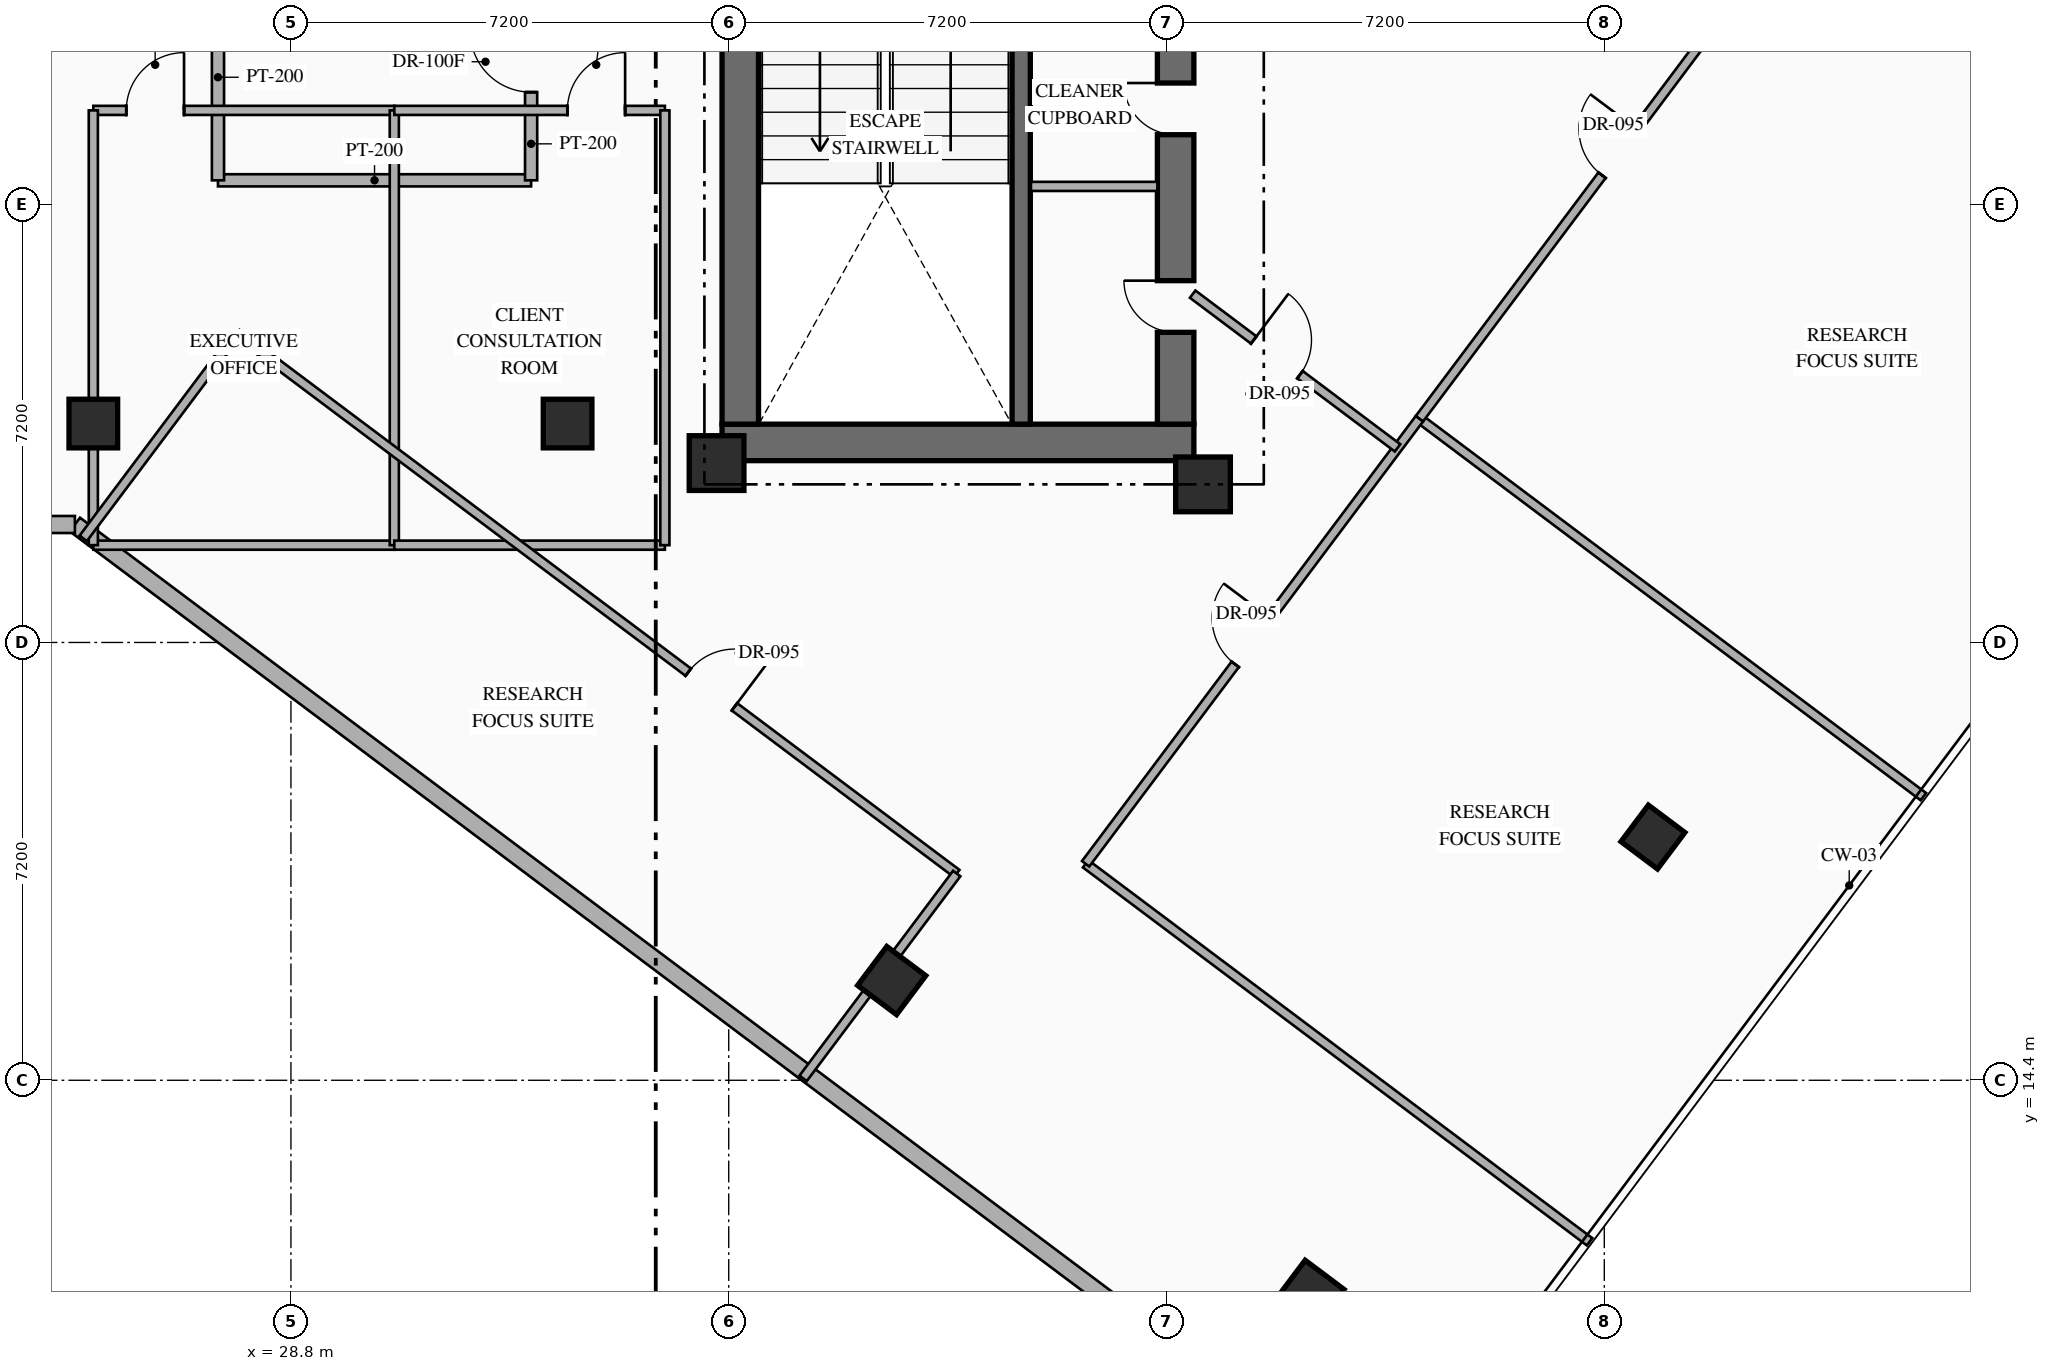
"""IFC4 building model, lengths in metres.
Left out: names, types, materials, properties, quantities, classifications, styles, units other than length and angle.
Written with IfcOpenShell. Run it as: python <this file> out.ifc"""

import sys

from ifc_helpers import new_model, si_unit, direction, frame, frame_2d, origin, origin_2d, place, context, subcontext, project, spatial, rectangle, hollow_rectangle, extrude, element, fill, save


model = new_model("IFC4")
c1 = context("Model", 3, precision=1e-05, world=origin(), true_north=direction((0.0, 1.0)))
c2 = subcontext(c1, "Body", "Model", "MODEL_VIEW")
j1 = project(units=[si_unit("LENGTHUNIT", "METRE"), si_unit("PLANEANGLEUNIT", "RADIAN")], contexts=[c1])
p1 = place(None, origin())
s1 = spatial("IfcSite", under=j1, at=p1, CompositionType="ELEMENT")
p2 = place(p1, origin())
s2 = spatial("IfcBuilding", under=s1, at=p2, CompositionType="ELEMENT")
p3 = place(p2, frame((0.0, 0.0, 174.45)))
s3 = spatial("IfcBuildingStorey", under=s2, at=p3, CompositionType="ELEMENT", Elevation=174.45)
p4 = place(p3, frame((35.89, 24.89, 0.0), z_axis=(0.0, 0.0, 1.0), x_axis=(1.0, 0.0, 0.0)))
e1 = element("IfcWall", 1, at=p4, inside=s3, PredefinedType="SHEAR", context=c2, shape_type="SweptSolid", body=[
    extrude(rectangle(XDim=7.76, YDim=0.6, at=frame_2d((3.88, 0.0))), origin(), (0.0, 0.0, 1.0), 3.6),
])
p5 = place(p3, frame((36.19, 25.19, 0.0), z_axis=(0.0, 0.0, 1.0), x_axis=(0.0, 1.0, 0.0)))
e2 = element("IfcWall", 2, at=p5, inside=s3, PredefinedType="SHEAR", context=c2, shape_type="SweptSolid", body=[
    extrude(rectangle(XDim=9.48, YDim=0.6, at=frame_2d((4.74, 0.0))), origin(), (0.0, 0.0, 1.0), 3.6),
])
p6 = place(p3, frame((43.35, 25.19, 0.0), z_axis=(0.0, 0.0, 1.0), x_axis=(0.0, 1.0, 0.0)))
e3 = element("IfcWall", 3, at=p6, inside=s3, PredefinedType="SHEAR", context=c2, shape_type="SweptSolid", body=[
    extrude(rectangle(XDim=9.48, YDim=0.6, at=frame_2d((4.74, 0.0))), origin(), (0.0, 0.0, 1.0), 3.6),
])
p7 = place(p6, frame((1.51, 0.0, 0.0)))
e4 = element("IfcOpeningElement", 4, at=p7, cuts=e3, PredefinedType="OPENING", context=c2, shape_type="SweptSolid", body=[
    extrude(rectangle(XDim=0.85, YDim=2.08, at=frame_2d((0.425, 1.04))), frame((0.0, 0.31, 0.0), z_axis=(0.0, -1.0, 0.0), x_axis=(1.0, 0.0, 0.0)), (0.0, 0.0, 1.0), 0.62),
])
p8 = place(p6, frame((4.76, 0.0, 0.0)))
e5 = element("IfcOpeningElement", 5, at=p8, cuts=e3, PredefinedType="OPENING", context=c2, shape_type="SweptSolid", body=[
    extrude(rectangle(XDim=0.85, YDim=2.08, at=frame_2d((0.425, 1.04))), frame((0.0, 0.31, 0.0), z_axis=(0.0, -1.0, 0.0), x_axis=(1.0, 0.0, 0.0)), (0.0, 0.0, 1.0), 0.62),
])
p9 = place(p3, frame((40.81, 25.19, 0.0), z_axis=(0.0, 0.0, 1.0), x_axis=(0.0, 1.0, 0.0)))
e6 = element("IfcWall", 6, at=p9, inside=s3, PredefinedType="SHEAR", context=c2, shape_type="SweptSolid", body=[
    extrude(rectangle(XDim=9.48, YDim=0.3, at=frame_2d((4.74, 0.0))), origin(), (0.0, 0.0, 1.0), 3.6),
])
for number, where, z_axis, x_axis in (
    (7, (35.8, 24.55, 0.0), (0.0, 0.0, 1.0), (1.0, 0.0, 0.0)),
    (8, (43.8, 24.2, 0.0), (0.0, 0.0, 1.0), (1.0, 0.0, 0.0)),
):
    element("IfcColumn", number, at=place(p3, frame(where, z_axis=z_axis, x_axis=x_axis)), inside=s3, PredefinedType="COLUMN", context=c2, shape_type="SweptSolid", body=[
        extrude(rectangle(XDim=0.9, YDim=0.9, at=origin_2d()), origin(), (0.0, 0.0, 1.0), 3.6),
    ])
for number, where, z_axis, x_axis in (
    (9, (25.55, 25.2, 0.0), (0.0, 0.0, 1.0), (1.0, 0.0, 0.0)),
    (10, (33.35, 25.2, 0.0), (0.0, 0.0, 1.0), (1.0, 0.0, 0.0)),
    (11, (38.68, 16.04, 0.0), (0.0, 0.0, 1.0), (0.8, -0.6, 0.0)),
    (12, (45.56, 10.88, 0.0), (0.0, 0.0, 1.0), (0.8, -0.6, 0.0)),
):
    element("IfcColumn", number, at=place(p3, frame(where, z_axis=z_axis, x_axis=x_axis)), inside=s3, PredefinedType="COLUMN", context=c2, shape_type="SweptSolid", body=[
        extrude(hollow_rectangle(XDim=0.8, YDim=0.8, WallThickness=0.032, at=origin_2d()), origin(), (0.0, 0.0, 1.0), 3.6),
    ])
p10 = place(p3, frame((51.2, 18.4, 0.0), z_axis=(0.0, 0.0, 1.0), x_axis=(0.799999996291, -0.600000004945, 0.0)))
e13 = element("IfcColumn", 13, at=p10, inside=s3, PredefinedType="COLUMN", context=c2, shape_type="SweptSolid", body=[
    extrude(hollow_rectangle(XDim=0.75, YDim=0.75, WallThickness=0.028, at=origin_2d()), origin(), (0.0, 0.0, 1.0), 3.6),
])
p11 = place(p3, frame((44.86, 40.73, 0.0), z_axis=(0.0, 0.0, 1.0), x_axis=(0.800007624502, -0.599989833863, 0.0)))
e14 = element("IfcWall", 14, at=p11, inside=s3, PredefinedType="STANDARD", context=c2, shape_type="SweptSolid", body=[
    extrude(rectangle(XDim=19.212, YDim=0.28, at=frame_2d((9.606, 0.0))), origin(), (0.0, 0.0, 1.0), 3.35),
])
p12 = place(p11, frame((1.755, 0.0, 0.0)))
e15 = element("IfcOpeningElement", 15, at=p12, cuts=e14, PredefinedType="OPENING", context=c2, shape_type="SweptSolid", body=[
    extrude(rectangle(XDim=1.1, YDim=2.2, at=frame_2d((0.55, 1.1))), frame((0.0, 0.15, 0.0), z_axis=(0.0, -1.0, 0.0), x_axis=(1.0, 0.0, 0.0)), (0.0, 0.0, 1.0), 0.3),
])
p13 = place(p11, frame((13.509, 0.0, 0.85)))
e16 = element("IfcOpeningElement", 16, at=p13, cuts=e14, PredefinedType="OPENING", context=c2, shape_type="SweptSolid", body=[
    extrude(rectangle(XDim=1.8, YDim=2.1, at=frame_2d((0.9, 1.05))), frame((0.0, 0.15, 0.0), z_axis=(0.0, -1.0, 0.0), x_axis=(1.0, 0.0, 0.0)), (0.0, 0.0, 1.0), 0.3),
])
p14 = place(p3, frame((44.918, 8.787, 0.0), z_axis=(0.0, 0.0, 1.0), x_axis=(-0.800004765927, 0.599993645378, 0.0)))
e17 = element("IfcWall", 17, at=p14, inside=s3, PredefinedType="STANDARD", context=c2, shape_type="SweptSolid", body=[
    extrude(rectangle(XDim=24.588, YDim=0.28, at=frame_2d((12.294, 0.0))), origin(), (0.0, 0.0, 1.0), 3.35),
])
p15 = place(p3, frame((25.247, 23.54, 0.0), z_axis=(0.0, 0.0, 1.0), x_axis=(-1.0, 0.0, 0.0)))
e18 = element("IfcWall", 18, at=p15, inside=s3, PredefinedType="STANDARD", context=c2, shape_type="SweptSolid", body=[
    extrude(rectangle(XDim=6.747, YDim=0.28, at=frame_2d((3.374, 0.0))), origin(), (0.0, 0.0, 1.0), 3.35),
])
p16 = place(p3, frame((40.97, 29.1, 0.0), z_axis=(0.0, 0.0, 1.0), x_axis=(1.0, 0.0, 0.0)))
e19 = element("IfcWall", 19, at=p16, inside=s3, PredefinedType="PARTITIONING", context=c2, shape_type="SweptSolid", body=[
    extrude(rectangle(XDim=2.08, YDim=0.15, at=frame_2d((1.04, 0.0))), origin(), (0.0, 0.0, 1.0), 3.35),
])
p17 = place(p3, frame((27.6, 29.2, 0.0), z_axis=(0.0, 0.0, 1.0), x_axis=(1.0, 0.0, 0.0)))
e20 = element("IfcWall", 20, at=p17, inside=s3, PredefinedType="STANDARD", context=c2, shape_type="SweptSolid", body=[
    extrude(rectangle(XDim=5.15, YDim=0.2, at=frame_2d((2.575, 0.0))), origin(), (0.0, 0.0, 1.0), 3.35),
])
p18 = place(p3, frame((27.6, 29.2, 0.0), z_axis=(0.0, 0.0, 1.0), x_axis=(0.0, 1.0, 0.0)))
e21 = element("IfcWall", 21, at=p18, inside=s3, PredefinedType="STANDARD", context=c2, shape_type="SweptSolid", body=[
    extrude(rectangle(XDim=3.39, YDim=0.2, at=frame_2d((1.695, 0.0))), origin(), (0.0, 0.0, 1.0), 3.35),
])
p19 = place(p3, frame((32.75, 29.2, 0.0), z_axis=(0.0, 0.0, 1.0), x_axis=(0.0, 1.0, 0.0)))
e22 = element("IfcWall", 22, at=p19, inside=s3, PredefinedType="STANDARD", context=c2, shape_type="SweptSolid", body=[
    extrude(rectangle(XDim=3.39, YDim=0.2, at=frame_2d((1.695, 0.0))), origin(), (0.0, 0.0, 1.0), 3.35),
])
p20 = place(p19, frame((1.45, 0.0, 0.0)))
e23 = element("IfcOpeningElement", 23, at=p20, cuts=e22, PredefinedType="OPENING", context=c2, shape_type="SweptSolid", body=[
    extrude(rectangle(XDim=1.0, YDim=2.2, at=frame_2d((0.5, 1.1))), frame((0.0, 0.11, 0.0), z_axis=(0.0, -1.0, 0.0), x_axis=(1.0, 0.0, 0.0)), (0.0, 0.0, 1.0), 0.22),
])
p21 = place(p3, frame((25.55, 23.2, 0.0), z_axis=(0.0, 0.0, 1.0), x_axis=(1.0, 0.0, 0.0)))
e24 = element("IfcWall", 24, at=p21, inside=s3, PredefinedType="PARTITIONING", context=c2, shape_type="SweptSolid", body=[
    extrude(rectangle(XDim=4.95, YDim=0.15, at=frame_2d((2.475, 0.0))), origin(), (0.0, 0.0, 1.0), 3.35),
])
p22 = place(p3, frame((25.55, 30.35, 0.0), z_axis=(0.0, 0.0, 1.0), x_axis=(1.0, 0.0, 0.0)))
e25 = element("IfcWall", 25, at=p22, inside=s3, PredefinedType="PARTITIONING", context=c2, shape_type="SweptSolid", body=[
    extrude(rectangle(XDim=4.95, YDim=0.15, at=frame_2d((2.475, 0.0))), origin(), (0.0, 0.0, 1.0), 3.35),
])
p23 = place(p22, frame((0.542, 0.0, 0.0)))
e26 = element("IfcOpeningElement", 26, at=p23, cuts=e25, PredefinedType="OPENING", context=c2, shape_type="SweptSolid", body=[
    extrude(rectangle(XDim=0.95, YDim=2.15, at=frame_2d((0.475, 1.075))), frame((0.0, 0.085, 0.0), z_axis=(0.0, -1.0, 0.0), x_axis=(1.0, 0.0, 0.0)), (0.0, 0.0, 1.0), 0.17),
])
p24 = place(p3, frame((25.55, 23.2, 0.0), z_axis=(0.0, 0.0, 1.0), x_axis=(0.0, 1.0, 0.0)))
e27 = element("IfcWall", 27, at=p24, inside=s3, PredefinedType="PARTITIONING", context=c2, shape_type="SweptSolid", body=[
    extrude(rectangle(XDim=7.15, YDim=0.15, at=frame_2d((3.575, 0.0))), origin(), (0.0, 0.0, 1.0), 2.695),
])
p25 = place(p3, frame((30.5, 23.2, 0.0), z_axis=(0.0, 0.0, 1.0), x_axis=(0.0, 1.0, 0.0)))
e28 = element("IfcWall", 28, at=p25, inside=s3, PredefinedType="PARTITIONING", context=c2, shape_type="SweptSolid", body=[
    extrude(rectangle(XDim=7.15, YDim=0.15, at=frame_2d((3.575, 0.0))), origin(), (0.0, 0.0, 1.0), 3.35),
])
p26 = place(p3, frame((30.5, 23.2, 0.0), z_axis=(0.0, 0.0, 1.0), x_axis=(1.0, 0.0, 0.0)))
e29 = element("IfcWall", 29, at=p26, inside=s3, PredefinedType="PARTITIONING", context=c2, shape_type="SweptSolid", body=[
    extrude(rectangle(XDim=4.45, YDim=0.15, at=frame_2d((2.225, 0.0))), origin(), (0.0, 0.0, 1.0), 3.35),
])
p27 = place(p3, frame((30.5, 30.35, 0.0), z_axis=(0.0, 0.0, 1.0), x_axis=(1.0, 0.0, 0.0)))
e30 = element("IfcWall", 30, at=p27, inside=s3, PredefinedType="PARTITIONING", context=c2, shape_type="SweptSolid", body=[
    extrude(rectangle(XDim=4.45, YDim=0.15, at=frame_2d((2.225, 0.0))), origin(), (0.0, 0.0, 1.0), 3.35),
])
p28 = place(p27, frame((2.846, 0.0, 0.0)))
e31 = element("IfcOpeningElement", 31, at=p28, cuts=e30, PredefinedType="OPENING", context=c2, shape_type="SweptSolid", body=[
    extrude(rectangle(XDim=0.95, YDim=2.15, at=frame_2d((0.475, 1.075))), frame((0.0, 0.085, 0.0), z_axis=(0.0, -1.0, 0.0), x_axis=(1.0, 0.0, 0.0)), (0.0, 0.0, 1.0), 0.17),
])
p29 = place(p3, frame((34.95, 23.2, 0.0), z_axis=(0.0, 0.0, 1.0), x_axis=(0.0, 1.0, 0.0)))
e32 = element("IfcWall", 32, at=p29, inside=s3, PredefinedType="PARTITIONING", context=c2, shape_type="SweptSolid", body=[
    extrude(rectangle(XDim=7.15, YDim=0.15, at=frame_2d((3.575, 0.0))), origin(), (0.0, 0.0, 1.0), 3.35),
])
for number, where, z_axis, x_axis in (
    (33, (41.87, 17.96, 0.0), (0.0, 0.0, 1.0), (0.8, -0.6, 0.0)),
    (34, (47.36, 25.28, 0.0), (0.0, 0.0, 1.0), (0.8, -0.6, 0.0)),
):
    element("IfcWall", number, at=place(p3, frame(where, z_axis=z_axis, x_axis=x_axis)), inside=s3, PredefinedType="PARTITIONING", context=c2, shape_type="SweptSolid", body=[
        extrude(rectangle(XDim=10.36, YDim=0.15, at=frame_2d((5.18, 0.0))), origin(), (0.0, 0.0, 1.0), 3.35),
    ])
p30 = place(p3, frame((41.87, 17.96, 0.0), z_axis=(0.0, 0.0, 1.0), x_axis=(0.599995730889, 0.800003201816, 0.0)))
e35 = element("IfcWall", 35, at=p30, inside=s3, PredefinedType="PARTITIONING", context=c2, shape_type="SweptSolid", body=[
    extrude(rectangle(XDim=9.15, YDim=0.15, at=frame_2d((4.575, 0.0))), origin(), (0.0, 0.0, 1.0), 3.35),
])
p31 = place(p30, frame((4.1, 0.0, 0.0)))
e36 = element("IfcOpeningElement", 36, at=p31, cuts=e35, PredefinedType="OPENING", context=c2, shape_type="SweptSolid", body=[
    extrude(rectangle(XDim=0.95, YDim=2.15, at=frame_2d((0.475, 1.075))), frame((0.0, 0.085, 0.0), z_axis=(0.0, -1.0, 0.0), x_axis=(1.0, 0.0, 0.0)), (0.0, 0.0, 1.0), 0.17),
])
p32 = place(p3, frame((47.36, 25.28, 0.0), z_axis=(0.0, 0.0, 1.0), x_axis=(0.599992871789, 0.800005346109, 0.0)))
e37 = element("IfcWall", 37, at=p32, inside=s3, PredefinedType="PARTITIONING", context=c2, shape_type="SweptSolid", body=[
    extrude(rectangle(XDim=10.96, YDim=0.15, at=frame_2d((5.48, 0.0))), origin(), (0.0, 0.0, 1.0), 3.35),
])
p33 = place(p32, frame((5.005, 0.0, 0.0)))
e38 = element("IfcOpeningElement", 38, at=p33, cuts=e37, PredefinedType="OPENING", context=c2, shape_type="SweptSolid", body=[
    extrude(rectangle(XDim=0.95, YDim=2.15, at=frame_2d((0.475, 1.075))), frame((0.0, 0.085, 0.0), z_axis=(0.0, -1.0, 0.0), x_axis=(1.0, 0.0, 0.0)), (0.0, 0.0, 1.0), 0.17),
])
p34 = place(p3, frame((43.63, 27.328, 0.0), z_axis=(0.0, 0.0, 1.0), x_axis=(0.799972182084, -0.600037088764, 0.0)))
e39 = element("IfcWall", 39, at=p34, inside=s3, PredefinedType="PARTITIONING", context=c2, shape_type="SweptSolid", body=[
    extrude(rectangle(XDim=4.213, YDim=0.15, at=frame_2d((2.106, 0.0))), origin(), (0.0, 0.0, 1.0), 3.045),
])
p35 = place(p34, frame((1.256, 0.0, 0.0)))
e40 = element("IfcOpeningElement", 40, at=p35, cuts=e39, PredefinedType="OPENING", context=c2, shape_type="SweptSolid", body=[
    extrude(rectangle(XDim=0.95, YDim=2.15, at=frame_2d((0.475, 1.075))), frame((0.0, 0.085, 0.0), z_axis=(0.0, -1.0, 0.0), x_axis=(1.0, 0.0, 0.0)), (0.0, 0.0, 1.0), 0.17),
])
p36 = place(p3, frame((27.91, 26.68, 0.0), z_axis=(0.0, 0.0, 1.0), x_axis=(0.800005938517, -0.599992081896, 0.0)))
e41 = element("IfcWall", 41, at=p36, inside=s3, PredefinedType="PARTITIONING", context=c2, shape_type="SweptSolid", body=[
    extrude(rectangle(XDim=14.8, YDim=0.15, at=frame_2d((7.4, 0.0))), origin(), (0.0, 0.0, 1.0), 3.35),
])
p37 = place(p36, frame((9.281, 0.0, 0.0)))
e42 = element("IfcOpeningElement", 42, at=p37, cuts=e41, PredefinedType="OPENING", context=c2, shape_type="SweptSolid", body=[
    extrude(rectangle(XDim=0.95, YDim=2.15, at=frame_2d((0.475, 1.075))), frame((0.0, 0.085, 0.0), z_axis=(0.0, -1.0, 0.0), x_axis=(1.0, 0.0, 0.0)), (0.0, 0.0, 1.0), 0.17),
])
p38 = place(p3, frame((25.384, 23.312, 0.0), z_axis=(0.0, 0.0, 1.0), x_axis=(0.599990721155, 0.80000695905, 0.0)))
e43 = element("IfcWall", 43, at=p38, inside=s3, PredefinedType="PARTITIONING", context=c2, shape_type="SweptSolid", body=[
    extrude(rectangle(XDim=4.21, YDim=0.15, at=frame_2d((2.105, 0.0))), origin(), (0.0, 0.0, 1.0), 3.35),
])
p39 = place(p3, frame((37.224, 14.432, 0.0), z_axis=(0.0, 0.0, 1.0), x_axis=(0.599962885857, 0.800027834262, 0.0)))
e44 = element("IfcWall", 44, at=p39, inside=s3, PredefinedType="PARTITIONING", context=c2, shape_type="SweptSolid", body=[
    extrude(rectangle(XDim=4.21, YDim=0.15, at=frame_2d((2.105, 0.0))), origin(), (0.0, 0.0, 1.0), 2.695),
])
p40 = place(p7, origin())
e45 = element("IfcDoor", 45, at=p40, inside=s3, OperationType="SINGLE_SWING_RIGHT", PredefinedType="DOOR", context=c2, shape_type="SweptSolid", body=[
    extrude(rectangle(XDim=0.85, YDim=2.08, at=frame_2d((0.425, 1.04))), frame((0.0, 0.025, 0.0), z_axis=(0.0, -1.0, 0.0), x_axis=(1.0, 0.0, 0.0)), (0.0, 0.0, 1.0), 0.05),
])
fill(e4, e45)
p41 = place(p8, origin())
e46 = element("IfcDoor", 46, at=p41, inside=s3, OperationType="SINGLE_SWING_RIGHT", PredefinedType="DOOR", context=c2, shape_type="SweptSolid", body=[
    extrude(rectangle(XDim=0.85, YDim=2.08, at=frame_2d((0.425, 1.04))), frame((0.0, 0.025, 0.0), z_axis=(0.0, -1.0, 0.0), x_axis=(1.0, 0.0, 0.0)), (0.0, 0.0, 1.0), 0.05),
])
fill(e5, e46)
p42 = place(p20, origin())
e47 = element("IfcDoor", 47, at=p42, inside=s3, OperationType="SINGLE_SWING_RIGHT", PredefinedType="DOOR", context=c2, shape_type="SweptSolid", body=[
    extrude(rectangle(XDim=1.0, YDim=2.2, at=frame_2d((0.5, 1.1))), frame((0.0, 0.025, 0.0), z_axis=(0.0, -1.0, 0.0), x_axis=(1.0, 0.0, 0.0)), (0.0, 0.0, 1.0), 0.05),
])
fill(e23, e47)
p43 = place(p23, origin())
e48 = element("IfcDoor", 48, at=p43, inside=s3, OperationType="SINGLE_SWING_RIGHT", PredefinedType="DOOR", context=c2, shape_type="SweptSolid", body=[
    extrude(rectangle(XDim=0.95, YDim=2.15, at=frame_2d((0.475, 1.075))), frame((0.0, 0.025, 0.0), z_axis=(0.0, -1.0, 0.0), x_axis=(1.0, 0.0, 0.0)), (0.0, 0.0, 1.0), 0.05),
])
fill(e26, e48)
p44 = place(p28, origin())
e49 = element("IfcDoor", 49, at=p44, inside=s3, OperationType="SINGLE_SWING_RIGHT", PredefinedType="DOOR", context=c2, shape_type="SweptSolid", body=[
    extrude(rectangle(XDim=0.95, YDim=2.15, at=frame_2d((0.475, 1.075))), frame((0.0, 0.025, 0.0), z_axis=(0.0, -1.0, 0.0), x_axis=(1.0, 0.0, 0.0)), (0.0, 0.0, 1.0), 0.05),
])
fill(e31, e49)
p45 = place(p31, origin())
e50 = element("IfcDoor", 50, at=p45, inside=s3, OperationType="SINGLE_SWING_RIGHT", PredefinedType="DOOR", context=c2, shape_type="SweptSolid", body=[
    extrude(rectangle(XDim=0.95, YDim=2.15, at=frame_2d((0.475, 1.075))), frame((0.0, 0.025, 0.0), z_axis=(0.0, -1.0, 0.0), x_axis=(1.0, 0.0, 0.0)), (0.0, 0.0, 1.0), 0.05),
])
fill(e36, e50)
p46 = place(p33, origin())
e51 = element("IfcDoor", 51, at=p46, inside=s3, OperationType="SINGLE_SWING_RIGHT", PredefinedType="DOOR", context=c2, shape_type="SweptSolid", body=[
    extrude(rectangle(XDim=0.95, YDim=2.15, at=frame_2d((0.475, 1.075))), frame((0.0, 0.025, 0.0), z_axis=(0.0, -1.0, 0.0), x_axis=(1.0, 0.0, 0.0)), (0.0, 0.0, 1.0), 0.05),
])
fill(e38, e51)
p47 = place(p35, origin())
e52 = element("IfcDoor", 52, at=p47, inside=s3, OperationType="SINGLE_SWING_LEFT", PredefinedType="DOOR", context=c2, shape_type="SweptSolid", body=[
    extrude(rectangle(XDim=0.95, YDim=2.15, at=frame_2d((0.475, 1.075))), frame((0.0, 0.025, 0.0), z_axis=(0.0, -1.0, 0.0), x_axis=(1.0, 0.0, 0.0)), (0.0, 0.0, 1.0), 0.05),
])
fill(e40, e52)
p48 = place(p37, origin())
e53 = element("IfcDoor", 53, at=p48, inside=s3, OperationType="SINGLE_SWING_RIGHT", PredefinedType="DOOR", context=c2, shape_type="SweptSolid", body=[
    extrude(rectangle(XDim=0.95, YDim=2.15, at=frame_2d((0.475, 1.075))), frame((0.0, 0.025, 0.0), z_axis=(0.0, -1.0, 0.0), x_axis=(1.0, 0.0, 0.0)), (0.0, 0.0, 1.0), 0.05),
])
fill(e42, e53)
save(model, sys.argv[1])
